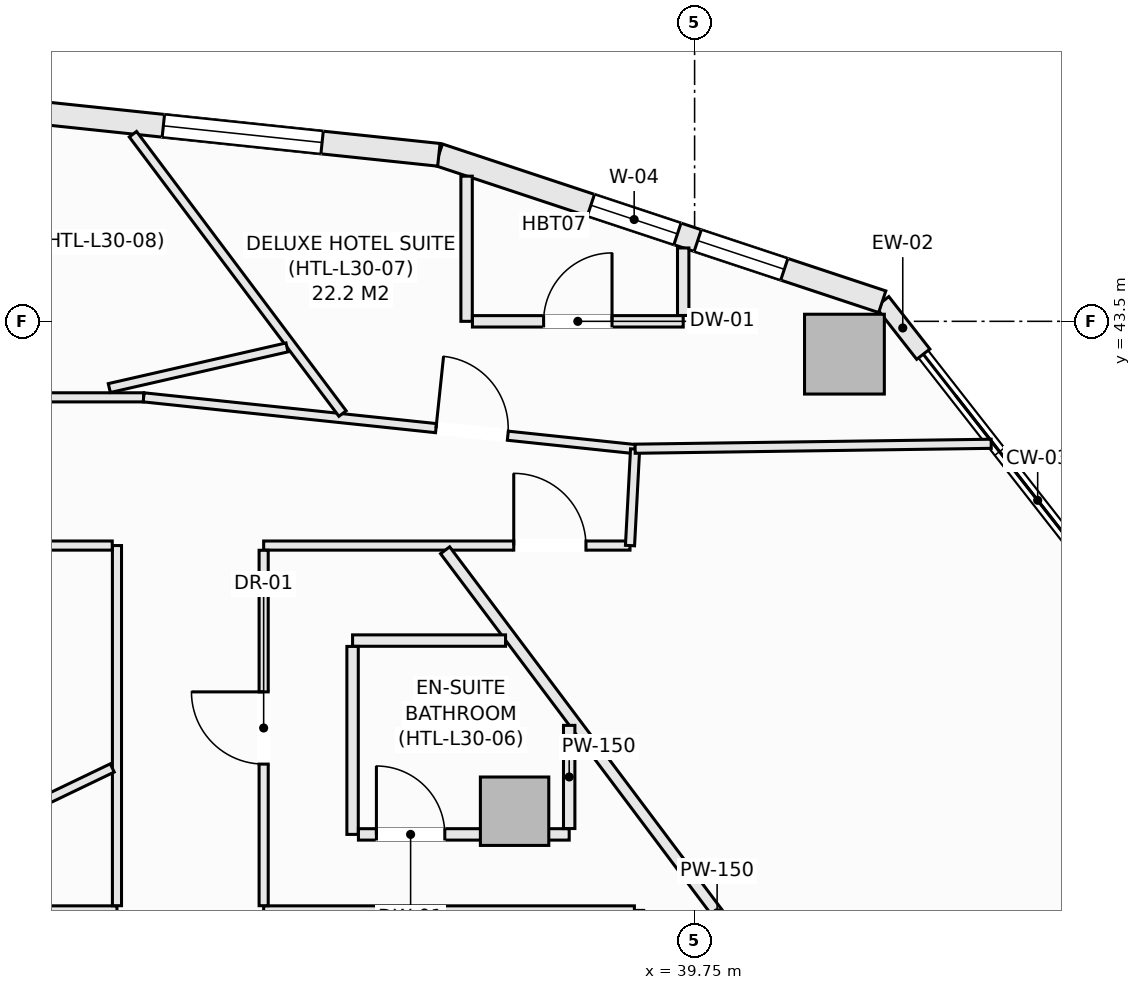
"""IFC4 building model, lengths in metres.
Left out: names, types, materials, properties, quantities, classifications, styles, units other than length and angle.
Written with IfcOpenShell. Run it as: python <this file> out.ifc"""

import sys

from ifc_helpers import new_model, si_unit, direction, frame, frame_2d, origin, origin_2d, place, context, subcontext, project, spatial, rectangle, extrude, element, fill, save


model = new_model("IFC4")
c1 = context("Model", 3, precision=1e-05, world=origin(), true_north=direction((0.0, 1.0)))
c2 = subcontext(c1, "Body", "Model", "MODEL_VIEW")
j1 = project(units=[si_unit("LENGTHUNIT", "METRE"), si_unit("PLANEANGLEUNIT", "RADIAN")], contexts=[c1])
p1 = place(None, origin())
s1 = spatial("IfcSite", under=j1, at=p1, CompositionType="ELEMENT")
p2 = place(p1, origin())
s2 = spatial("IfcBuilding", under=s1, at=p2, CompositionType="ELEMENT")
p3 = place(p2, frame((0.0, 0.0, 122.3)))
s3 = spatial("IfcBuildingStorey", under=s2, at=p3, CompositionType="ELEMENT", Elevation=122.3)
p4 = place(p3, frame((41.721, 43.068, -0.27), z_axis=(0.0, 0.0, 1.0), x_axis=(1.0, 0.0, 0.0)))
e1 = element("IfcColumn", 1, at=p4, inside=s3, PredefinedType="COLUMN", context=c2, shape_type="SweptSolid", body=[
    extrude(rectangle(XDim=1.05, YDim=1.05, at=origin_2d()), origin(), (0.0, 0.0, 1.0), 3.4),
])
p5 = place(p3, frame((37.382, 37.055, -0.27), z_axis=(0.0, 0.0, 1.0), x_axis=(1.0, 0.0, 0.0)))
e2 = element("IfcColumn", 2, at=p5, inside=s3, PredefinedType="COLUMN", context=c2, shape_type="SweptSolid", body=[
    extrude(rectangle(XDim=0.9, YDim=0.9, at=origin_2d()), origin(), (0.0, 0.0, 1.0), 3.4),
])
p6 = place(p3, frame((42.219, 43.758, 0.0), z_axis=(0.0, 0.0, 1.0), x_axis=(0.61650363284, -0.787352062736, 0.0)))
e3 = element("IfcWall", 3, at=p6, inside=s3, PredefinedType="SOLIDWALL", context=c2, shape_type="SweptSolid", body=[
    extrude(rectangle(XDim=0.876, YDim=0.22, at=frame_2d((0.438, 0.0))), origin(), (0.0, 0.0, 1.0), 2.653),
])
p7 = place(p3, frame((36.385, 45.691, 0.0), z_axis=(0.0, 0.0, 1.0), x_axis=(0.949238009374, -0.314558741032, 0.0)))
e4 = element("IfcWall", 4, at=p7, inside=s3, PredefinedType="SOLIDWALL", context=c2, shape_type="SweptSolid", body=[
    extrude(rectangle(XDim=6.146, YDim=0.3, at=frame_2d((3.073, 0.0))), origin(), (0.0, 0.0, 1.0), 2.653),
])
p8 = place(p7, frame((2.107, 0.0, 0.74)))
e5 = element("IfcOpeningElement", 5, at=p8, cuts=e4, PredefinedType="OPENING", context=c2, shape_type="SweptSolid", body=[
    extrude(rectangle(XDim=1.2, YDim=1.7, at=frame_2d((0.6, 0.85))), frame((0.0, 0.16, 0.0), z_axis=(0.0, -1.0, 0.0), x_axis=(1.0, 0.0, 0.0)), (0.0, 0.0, 1.0), 0.32),
])
p9 = place(p7, frame((3.588, 0.0, 0.74)))
e6 = element("IfcOpeningElement", 6, at=p9, cuts=e4, PredefinedType="OPENING", context=c2, shape_type="SweptSolid", body=[
    extrude(rectangle(XDim=1.2, YDim=1.7, at=frame_2d((0.6, 0.85))), frame((0.0, 0.16, 0.0), z_axis=(0.0, -1.0, 0.0), x_axis=(1.0, 0.0, 0.0)), (0.0, 0.0, 1.0), 0.32),
])
p10 = place(p3, frame((30.125, 46.35, 0.0), z_axis=(0.0, 0.0, 1.0), x_axis=(0.994498012394, -0.104755445421, 0.0)))
e7 = element("IfcWall", 7, at=p10, inside=s3, PredefinedType="SOLIDWALL", context=c2, shape_type="SweptSolid", body=[
    extrude(rectangle(XDim=6.295, YDim=0.3, at=frame_2d((3.147, 0.0))), origin(), (0.0, 0.0, 1.0), 2.653),
])
p11 = place(p10, frame((2.65, 0.0, 0.74)))
e8 = element("IfcOpeningElement", 8, at=p11, cuts=e7, PredefinedType="OPENING", context=c2, shape_type="SweptSolid", body=[
    extrude(rectangle(XDim=2.1, YDim=1.7, at=frame_2d((1.05, 0.85))), frame((0.0, 0.16, 0.0), z_axis=(0.0, -1.0, 0.0), x_axis=(1.0, 0.0, 0.0)), (0.0, 0.0, 1.0), 0.32),
])
p12 = place(p3, frame((29.842, 35.75, 0.0), z_axis=(0.0, 0.0, 1.0), x_axis=(1.0, 0.0, 0.0)))
e9 = element("IfcWall", 9, at=p12, inside=s3, PredefinedType="PARTITIONING", context=c2, shape_type="SweptSolid", body=[
    extrude(rectangle(XDim=2.308, YDim=0.12, at=frame_2d((1.154, 0.0))), origin(), (0.0, 0.0, 1.0), 3.13),
])
p13 = place(p3, frame((34.08, 35.75, 0.0), z_axis=(0.0, 0.0, 1.0), x_axis=(1.0, 0.0, 0.0)))
e10 = element("IfcWall", 10, at=p13, inside=s3, PredefinedType="PARTITIONING", context=c2, shape_type="SweptSolid", body=[
    extrude(rectangle(XDim=4.878, YDim=0.12, at=frame_2d((2.439, 0.0))), origin(), (0.0, 0.0, 1.0), 2.505),
])
p14 = place(p3, frame((32.15, 35.812, 0.0), z_axis=(0.0, 0.0, 1.0), x_axis=(0.0, 1.0, 0.0)))
e11 = element("IfcWall", 11, at=p14, inside=s3, PredefinedType="PARTITIONING", context=c2, shape_type="SweptSolid", body=[
    extrude(rectangle(XDim=4.738, YDim=0.12, at=frame_2d((2.369, 0.0))), origin(), (0.0, 0.0, 1.0), 3.13),
])
p15 = place(p3, frame((21.351, 40.55, 0.0), z_axis=(0.0, 0.0, 1.0), x_axis=(1.0, 0.0, 0.0)))
e12 = element("IfcWall", 12, at=p15, inside=s3, PredefinedType="PARTITIONING", context=c2, shape_type="SweptSolid", body=[
    extrude(rectangle(XDim=10.737, YDim=0.12, at=frame_2d((5.369, 0.0))), origin(), (0.0, 0.0, 1.0), 3.13),
])
p16 = place(p15, frame((5.092, 0.0, 0.0)))
e13 = element("IfcOpeningElement", 13, at=p16, cuts=e12, PredefinedType="OPENING", context=c2, shape_type="SweptSolid", body=[
    extrude(rectangle(XDim=0.95, YDim=2.1, at=frame_2d((0.475, 1.05))), frame((0.0, 0.07, 0.0), z_axis=(0.0, -1.0, 0.0), x_axis=(1.0, 0.0, 0.0)), (0.0, 0.0, 1.0), 0.14),
])
p17 = place(p3, frame((34.08, 40.55, 0.0), z_axis=(0.0, 0.0, 1.0), x_axis=(1.0, 0.0, 0.0)))
e14 = element("IfcWall", 14, at=p17, inside=s3, PredefinedType="PARTITIONING", context=c2, shape_type="SweptSolid", body=[
    extrude(rectangle(XDim=4.82, YDim=0.12, at=frame_2d((2.41, 0.0))), origin(), (0.0, 0.0, 1.0), 3.13),
])
p18 = place(p17, frame((3.291, 0.0, 0.0)))
e15 = element("IfcOpeningElement", 15, at=p18, cuts=e14, PredefinedType="OPENING", context=c2, shape_type="SweptSolid", body=[
    extrude(rectangle(XDim=0.95, YDim=2.1, at=frame_2d((0.475, 1.05))), frame((0.0, 0.07, 0.0), z_axis=(0.0, -1.0, 0.0), x_axis=(1.0, 0.0, 0.0)), (0.0, 0.0, 1.0), 0.14),
])
p19 = place(p3, frame((27.749, 42.5, 0.0), z_axis=(0.0, 0.0, 1.0), x_axis=(1.0, 0.0, 0.0)))
e16 = element("IfcWall", 16, at=p19, inside=s3, PredefinedType="PARTITIONING", context=c2, shape_type="SweptSolid", body=[
    extrude(rectangle(XDim=4.752, YDim=0.12, at=frame_2d((2.376, 0.0))), origin(), (0.0, 0.0, 1.0), 3.13),
])
p20 = place(p3, frame((32.501, 42.5, 0.0), z_axis=(0.0, 0.0, 1.0), x_axis=(0.994501131299, -0.104725831799, 0.0)))
e17 = element("IfcWall", 17, at=p20, inside=s3, PredefinedType="PARTITIONING", context=c2, shape_type="SweptSolid", body=[
    extrude(rectangle(XDim=6.502, YDim=0.12, at=frame_2d((3.251, 0.0))), origin(), (0.0, 0.0, 1.0), 3.13),
])
p21 = place(p20, frame((3.868, 0.0, 0.0)))
e18 = element("IfcOpeningElement", 18, at=p21, cuts=e17, PredefinedType="OPENING", context=c2, shape_type="SweptSolid", body=[
    extrude(rectangle(XDim=0.95, YDim=2.1, at=frame_2d((0.475, 1.05))), frame((0.0, 0.07, 0.0), z_axis=(0.0, -1.0, 0.0), x_axis=(1.0, 0.0, 0.0)), (0.0, 0.0, 1.0), 0.14),
])
p22 = place(p3, frame((38.9, 40.55, 0.0), z_axis=(0.0, 0.0, 1.0), x_axis=(0.052810816763, 0.998604535155, 0.0)))
e19 = element("IfcWall", 19, at=p22, inside=s3, PredefinedType="PARTITIONING", context=c2, shape_type="SweptSolid", body=[
    extrude(rectangle(XDim=1.271, YDim=0.12, at=frame_2d((0.636, 0.0))), origin(), (0.0, 0.0, 1.0), 3.13),
])
p23 = place(p3, frame((34.08, 35.812, 0.0), z_axis=(0.0, 0.0, 1.0), x_axis=(0.0, 1.0, 0.0)))
e20 = element("IfcWall", 20, at=p23, inside=s3, PredefinedType="PARTITIONING", context=c2, shape_type="SweptSolid", body=[
    extrude(rectangle(XDim=4.676, YDim=0.12, at=frame_2d((2.338, 0.0))), origin(), (0.0, 0.0, 1.0), 2.812),
])
p24 = place(p23, frame((1.863, 0.0, 0.0)))
e21 = element("IfcOpeningElement", 21, at=p24, cuts=e20, PredefinedType="OPENING", context=c2, shape_type="SweptSolid", body=[
    extrude(rectangle(XDim=0.95, YDim=2.1, at=frame_2d((0.475, 1.05))), frame((0.0, 0.07, 0.0), z_axis=(0.0, -1.0, 0.0), x_axis=(1.0, 0.0, 0.0)), (0.0, 0.0, 1.0), 0.14),
])
p25 = place(p3, frame((29.842, 36.546, 0.0), z_axis=(0.0, 0.0, 1.0), x_axis=(0.901428229546, 0.432928570294, 0.0)))
e22 = element("IfcWall", 22, at=p25, inside=s3, PredefinedType="PARTITIONING", context=c2, shape_type="SweptSolid", body=[
    extrude(rectangle(XDim=2.491, YDim=0.12, at=frame_2d((1.246, 0.0))), origin(), (0.0, 0.0, 1.0), 3.13),
])
p26 = place(p3, frame((32.36, 45.962, 0.0), z_axis=(0.0, 0.0, 1.0), x_axis=(0.600221002096, -0.799834200721, 0.0)))
e23 = element("IfcWall", 23, at=p26, inside=s3, PredefinedType="PARTITIONING", context=c2, shape_type="SweptSolid", body=[
    extrude(rectangle(XDim=4.595, YDim=0.12, at=frame_2d((2.297, 0.0))), origin(), (0.0, 0.0, 1.0), 3.13),
])
p27 = place(p3, frame((36.468, 40.488, 0.0), z_axis=(0.0, 0.0, 1.0), x_axis=(0.600219452556, -0.799835363543, 0.0)))
e24 = element("IfcWall", 24, at=p27, inside=s3, PredefinedType="PARTITIONING", context=c2, shape_type="SweptSolid", body=[
    extrude(rectangle(XDim=11.925, YDim=0.15, at=frame_2d((5.962, 0.0))), origin(), (0.0, 0.0, 1.0), 3.13),
])
p28 = place(p3, frame((38.968, 41.824, 0.0), z_axis=(0.0, 0.0, 1.0), x_axis=(0.999903934819, 0.013860776834, 0.0)))
e25 = element("IfcWall", 25, at=p28, inside=s3, PredefinedType="PARTITIONING", context=c2, shape_type="SweptSolid", body=[
    extrude(rectangle(XDim=4.685, YDim=0.12, at=frame_2d((2.343, 0.0))), origin(), (0.0, 0.0, 1.0), 3.13),
])
p29 = place(p3, frame((35.25, 39.3, 0.0), z_axis=(0.0, 0.0, 1.0), x_axis=(1.0, 0.0, 0.0)))
e26 = element("IfcWall", 26, at=p29, inside=s3, PredefinedType="PARTITIONING", context=c2, shape_type="SweptSolid", body=[
    extrude(rectangle(XDim=2.013, YDim=0.15, at=frame_2d((1.006, 0.0))), origin(), (0.0, 0.0, 1.0), 3.13),
])
p30 = place(p3, frame((35.25, 36.75, 0.0), z_axis=(0.0, 0.0, 1.0), x_axis=(0.0, 1.0, 0.0)))
e27 = element("IfcWall", 27, at=p30, inside=s3, PredefinedType="PARTITIONING", context=c2, shape_type="SweptSolid", body=[
    extrude(rectangle(XDim=2.473, YDim=0.15, at=frame_2d((1.236, 0.0))), origin(), (0.0, 0.0, 1.0), 3.13),
])
p31 = place(p3, frame((35.327, 36.75, 0.0), z_axis=(0.0, 0.0, 1.0), x_axis=(1.0, 0.0, 0.0)))
e28 = element("IfcWall", 28, at=p31, inside=s3, PredefinedType="PARTITIONING", context=c2, shape_type="SweptSolid", body=[
    extrude(rectangle(XDim=2.773, YDim=0.15, at=frame_2d((1.387, 0.0))), origin(), (0.0, 0.0, 1.0), 2.505),
])
p32 = place(p31, frame((0.237, 0.0, 0.0)))
e29 = element("IfcOpeningElement", 29, at=p32, cuts=e28, PredefinedType="OPENING", context=c2, shape_type="SweptSolid", body=[
    extrude(rectangle(XDim=0.9, YDim=2.1, at=frame_2d((0.45, 1.05))), frame((0.0, 0.085, 0.0), z_axis=(0.0, -1.0, 0.0), x_axis=(1.0, 0.0, 0.0)), (0.0, 0.0, 1.0), 0.17),
])
p33 = place(p3, frame((38.1, 36.827, 0.0), z_axis=(0.0, 0.0, 1.0), x_axis=(0.0, 1.0, 0.0)))
e30 = element("IfcWall", 30, at=p33, inside=s3, PredefinedType="PARTITIONING", context=c2, shape_type="SweptSolid", body=[
    extrude(rectangle(XDim=1.357, YDim=0.15, at=frame_2d((0.679, 0.0))), origin(), (0.0, 0.0, 1.0), 2.505),
])
p34 = place(p3, frame((36.75, 43.5, 0.0), z_axis=(0.0, 0.0, 1.0), x_axis=(0.0, 1.0, 0.0)))
e31 = element("IfcWall", 31, at=p34, inside=s3, PredefinedType="PARTITIONING", context=c2, shape_type="SweptSolid", body=[
    extrude(rectangle(XDim=1.91, YDim=0.15, at=frame_2d((0.955, 0.0))), origin(), (0.0, 0.0, 1.0), 3.13),
])
p35 = place(p3, frame((36.827, 43.5, 0.0), z_axis=(0.0, 0.0, 1.0), x_axis=(1.0, 0.0, 0.0)))
e32 = element("IfcWall", 32, at=p35, inside=s3, PredefinedType="PARTITIONING", context=c2, shape_type="SweptSolid", body=[
    extrude(rectangle(XDim=2.773, YDim=0.15, at=frame_2d((1.387, 0.0))), origin(), (0.0, 0.0, 1.0), 2.653),
])
p36 = place(p35, frame((0.937, 0.0, 0.0)))
e33 = element("IfcOpeningElement", 33, at=p36, cuts=e32, PredefinedType="OPENING", context=c2, shape_type="SweptSolid", body=[
    extrude(rectangle(XDim=0.9, YDim=2.1, at=frame_2d((0.45, 1.05))), frame((0.0, 0.085, 0.0), z_axis=(0.0, -1.0, 0.0), x_axis=(1.0, 0.0, 0.0)), (0.0, 0.0, 1.0), 0.17),
])
p37 = place(p3, frame((39.6, 43.577, 0.0), z_axis=(0.0, 0.0, 1.0), x_axis=(0.0, 1.0, 0.0)))
e34 = element("IfcWall", 34, at=p37, inside=s3, PredefinedType="PARTITIONING", context=c2, shape_type="SweptSolid", body=[
    extrude(rectangle(XDim=0.888, YDim=0.15, at=frame_2d((0.444, 0.0))), origin(), (0.0, 0.0, 1.0), 3.13),
])
p38 = place(p3, frame((32.049, 42.622, 0.0), z_axis=(0.0, 0.0, 1.0), x_axis=(0.974809835499, 0.223037630491, 0.0)))
e35 = element("IfcWall", 35, at=p38, inside=s3, PredefinedType="PARTITIONING", context=c2, shape_type="SweptSolid", body=[
    extrude(rectangle(XDim=2.398, YDim=0.12, at=frame_2d((1.199, 0.0))), origin(), (0.0, 0.0, 1.0), 3.13),
])
p39 = place(p8, origin())
e36 = element("IfcWindow", 36, at=p39, inside=s3, PartitioningType="SINGLE_PANEL", PredefinedType="WINDOW", context=c2, shape_type="SweptSolid", body=[
    extrude(rectangle(XDim=1.2, YDim=1.7, at=frame_2d((0.6, 0.85))), frame((0.0, 0.03, 0.0), z_axis=(0.0, -1.0, 0.0), x_axis=(1.0, 0.0, 0.0)), (0.0, 0.0, 1.0), 0.06),
])
fill(e5, e36)
p40 = place(p11, origin())
e37 = element("IfcWindow", 37, at=p40, inside=s3, PartitioningType="SINGLE_PANEL", PredefinedType="WINDOW", context=c2, shape_type="SweptSolid", body=[
    extrude(rectangle(XDim=2.1, YDim=1.7, at=frame_2d((1.05, 0.85))), frame((0.0, 0.03, 0.0), z_axis=(0.0, -1.0, 0.0), x_axis=(1.0, 0.0, 0.0)), (0.0, 0.0, 1.0), 0.06),
])
fill(e8, e37)
p41 = place(p18, origin())
e38 = element("IfcDoor", 38, at=p41, inside=s3, OperationType="SINGLE_SWING_LEFT", PredefinedType="DOOR", context=c2, shape_type="SweptSolid", body=[
    extrude(rectangle(XDim=0.95, YDim=2.1, at=frame_2d((0.475, 1.05))), frame((0.0, 0.025, 0.0), z_axis=(0.0, -1.0, 0.0), x_axis=(1.0, 0.0, 0.0)), (0.0, 0.0, 1.0), 0.05),
])
fill(e15, e38)
p42 = place(p24, origin())
e39 = element("IfcDoor", 39, at=p42, inside=s3, OperationType="SINGLE_SWING_RIGHT", PredefinedType="DOOR", context=c2, shape_type="SweptSolid", body=[
    extrude(rectangle(XDim=0.95, YDim=2.1, at=frame_2d((0.475, 1.05))), frame((0.0, 0.025, 0.0), z_axis=(0.0, -1.0, 0.0), x_axis=(1.0, 0.0, 0.0)), (0.0, 0.0, 1.0), 0.05),
])
fill(e21, e39)
p43 = place(p21, origin())
e40 = element("IfcDoor", 40, at=p43, inside=s3, OperationType="SINGLE_SWING_LEFT", PredefinedType="DOOR", context=c2, shape_type="SweptSolid", body=[
    extrude(rectangle(XDim=0.95, YDim=2.1, at=frame_2d((0.475, 1.05))), frame((0.0, 0.025, 0.0), z_axis=(0.0, -1.0, 0.0), x_axis=(1.0, 0.0, 0.0)), (0.0, 0.0, 1.0), 0.05),
])
fill(e18, e40)
p44 = place(p32, origin())
e41 = element("IfcDoor", 41, at=p44, inside=s3, OperationType="SINGLE_SWING_LEFT", PredefinedType="DOOR", context=c2, shape_type="SweptSolid", body=[
    extrude(rectangle(XDim=0.9, YDim=2.1, at=frame_2d((0.45, 1.05))), frame((0.0, 0.025, 0.0), z_axis=(0.0, -1.0, 0.0), x_axis=(1.0, 0.0, 0.0)), (0.0, 0.0, 1.0), 0.05),
])
fill(e29, e41)
p45 = place(p36, origin())
e42 = element("IfcDoor", 42, at=p45, inside=s3, OperationType="SINGLE_SWING_RIGHT", PredefinedType="DOOR", context=c2, shape_type="SweptSolid", body=[
    extrude(rectangle(XDim=0.9, YDim=2.1, at=frame_2d((0.45, 1.05))), frame((0.0, 0.025, 0.0), z_axis=(0.0, -1.0, 0.0), x_axis=(1.0, 0.0, 0.0)), (0.0, 0.0, 1.0), 0.05),
])
fill(e33, e42)
p46 = place(p9, origin())
e43 = element("IfcWindow", 43, at=p46, inside=s3, PartitioningType="SINGLE_PANEL", PredefinedType="WINDOW", context=c2, shape_type="SweptSolid", body=[
    extrude(rectangle(XDim=1.2, YDim=1.7, at=frame_2d((0.6, 0.85))), frame((0.0, 0.03, 0.0), z_axis=(0.0, -1.0, 0.0), x_axis=(1.0, 0.0, 0.0)), (0.0, 0.0, 1.0), 0.06),
])
fill(e6, e43)
save(model, sys.argv[1])
